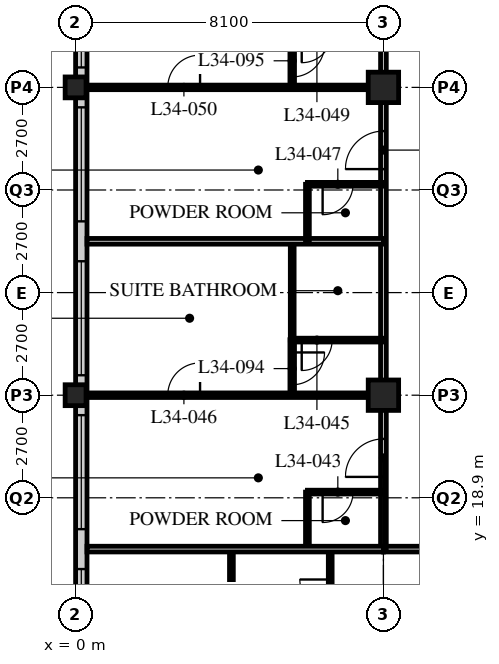
"""IFC4 building model, lengths in metres.
Left out: names, types, materials, properties, quantities, classifications, styles, units other than length and angle.
Written with IfcOpenShell. Run it as: python <this file> out.ifc"""

import sys

from ifc_helpers import new_model, si_unit, direction, frame, frame_2d, origin, origin_2d, place, context, subcontext, project, spatial, rectangle, hollow_rectangle, extrude, element, fill, save


model = new_model("IFC4")
c1 = context("Model", 3, precision=1e-05, world=origin(), true_north=direction((0.0, 1.0)))
c2 = subcontext(c1, "Body", "Model", "MODEL_VIEW")
j1 = project(units=[si_unit("LENGTHUNIT", "METRE"), si_unit("PLANEANGLEUNIT", "RADIAN")], contexts=[c1])
p1 = place(None, origin())
s1 = spatial("IfcSite", under=j1, at=p1, CompositionType="ELEMENT")
p2 = place(p1, origin())
s2 = spatial("IfcBuilding", under=s1, at=p2, CompositionType="ELEMENT")
p3 = place(p2, frame((0.0, 0.0, 134.0)))
s3 = spatial("IfcBuildingStorey", under=s2, at=p3, CompositionType="ELEMENT", Elevation=134.0)
for number, where, z_axis, x_axis in (
    (1, (0.0, 21.6, 0.0), (0.0, 0.0, 1.0), (1.0, 0.0, 0.0)),
    (2, (0.0, 29.7, 0.0), (0.0, 0.0, 1.0), (1.0, 0.0, 0.0)),
):
    element("IfcColumn", number, at=place(p3, frame(where, z_axis=z_axis, x_axis=x_axis)), inside=s3, PredefinedType="COLUMN", context=c2, shape_type="SweptSolid", body=[
        extrude(hollow_rectangle(XDim=0.55, YDim=0.55, WallThickness=0.04, at=origin_2d()), origin(), (0.0, 0.0, 1.0), 3.4),
    ])
for number, where, z_axis, x_axis in (
    (3, (8.1, 21.6, 0.0), (0.0, 0.0, 1.0), (1.0, 0.0, 0.0)),
    (4, (8.1, 29.7, 0.0), (0.0, 0.0, 1.0), (1.0, 0.0, 0.0)),
):
    element("IfcColumn", number, at=place(p3, frame(where, z_axis=z_axis, x_axis=x_axis)), inside=s3, PredefinedType="COLUMN", context=c2, shape_type="SweptSolid", body=[
        extrude(hollow_rectangle(XDim=0.8, YDim=0.8, WallThickness=0.08, at=origin_2d()), origin(), (0.0, 0.0, 1.0), 3.4),
    ])
p4 = place(p3, frame((0.15, 45.6, 0.0), z_axis=(0.0, 0.0, 1.0), x_axis=(0.0, -1.0, 0.0)))
e5 = element("IfcWall", 5, at=p4, inside=s3, PredefinedType="SOLIDWALL", context=c2, shape_type="SweptSolid", body=[
    extrude(rectangle(XDim=32.1, YDim=0.3, at=frame_2d((16.05, 0.0))), origin(), (0.0, 0.0, 1.0), 3.19),
])
p5 = place(p4, frame((0.225, 0.0, 0.9)))
e6 = element("IfcOpeningElement", 6, at=p5, cuts=e5, PredefinedType="OPENING", context=c2, shape_type="SweptSolid", body=[
    extrude(rectangle(XDim=3.0, YDim=2.0, at=frame_2d((1.5, 1.0))), frame((0.0, 0.16, 0.0), z_axis=(0.0, -1.0, 0.0), x_axis=(1.0, 0.0, 0.0)), (0.0, 0.0, 1.0), 0.32),
])
p6 = place(p4, frame((4.275, 0.0, 0.9)))
e7 = element("IfcOpeningElement", 7, at=p6, cuts=e5, PredefinedType="OPENING", context=c2, shape_type="SweptSolid", body=[
    extrude(rectangle(XDim=3.0, YDim=2.0, at=frame_2d((1.5, 1.0))), frame((0.0, 0.16, 0.0), z_axis=(0.0, -1.0, 0.0), x_axis=(1.0, 0.0, 0.0)), (0.0, 0.0, 1.0), 0.32),
])
p7 = place(p4, frame((8.325, 0.0, 0.9)))
e8 = element("IfcOpeningElement", 8, at=p7, cuts=e5, PredefinedType="OPENING", context=c2, shape_type="SweptSolid", body=[
    extrude(rectangle(XDim=3.0, YDim=2.0, at=frame_2d((1.5, 1.0))), frame((0.0, 0.16, 0.0), z_axis=(0.0, -1.0, 0.0), x_axis=(1.0, 0.0, 0.0)), (0.0, 0.0, 1.0), 0.32),
])
p8 = place(p4, frame((12.375, 0.0, 0.9)))
e9 = element("IfcOpeningElement", 9, at=p8, cuts=e5, PredefinedType="OPENING", context=c2, shape_type="SweptSolid", body=[
    extrude(rectangle(XDim=3.0, YDim=2.0, at=frame_2d((1.5, 1.0))), frame((0.0, 0.16, 0.0), z_axis=(0.0, -1.0, 0.0), x_axis=(1.0, 0.0, 0.0)), (0.0, 0.0, 1.0), 0.32),
])
p9 = place(p4, frame((16.425, 0.0, 0.9)))
e10 = element("IfcOpeningElement", 10, at=p9, cuts=e5, PredefinedType="OPENING", context=c2, shape_type="SweptSolid", body=[
    extrude(rectangle(XDim=3.0, YDim=2.0, at=frame_2d((1.5, 1.0))), frame((0.0, 0.16, 0.0), z_axis=(0.0, -1.0, 0.0), x_axis=(1.0, 0.0, 0.0)), (0.0, 0.0, 1.0), 0.32),
])
p10 = place(p4, frame((20.475, 0.0, 0.9)))
e11 = element("IfcOpeningElement", 11, at=p10, cuts=e5, PredefinedType="OPENING", context=c2, shape_type="SweptSolid", body=[
    extrude(rectangle(XDim=3.0, YDim=2.0, at=frame_2d((1.5, 1.0))), frame((0.0, 0.16, 0.0), z_axis=(0.0, -1.0, 0.0), x_axis=(1.0, 0.0, 0.0)), (0.0, 0.0, 1.0), 0.32),
])
p11 = place(p4, frame((24.525, 0.0, 0.9)))
e12 = element("IfcOpeningElement", 12, at=p11, cuts=e5, PredefinedType="OPENING", context=c2, shape_type="SweptSolid", body=[
    extrude(rectangle(XDim=3.0, YDim=2.0, at=frame_2d((1.5, 1.0))), frame((0.0, 0.16, 0.0), z_axis=(0.0, -1.0, 0.0), x_axis=(1.0, 0.0, 0.0)), (0.0, 0.0, 1.0), 0.32),
])
p12 = place(p4, frame((28.575, 0.0, 0.9)))
e13 = element("IfcOpeningElement", 13, at=p12, cuts=e5, PredefinedType="OPENING", context=c2, shape_type="SweptSolid", body=[
    extrude(rectangle(XDim=3.0, YDim=2.0, at=frame_2d((1.5, 1.0))), frame((0.0, 0.16, 0.0), z_axis=(0.0, -1.0, 0.0), x_axis=(1.0, 0.0, 0.0)), (0.0, 0.0, 1.0), 0.32),
])
p13 = place(p3, frame((8.1, 17.55, 0.0), z_axis=(0.0, 0.0, 1.0), x_axis=(1.0, 0.0, 0.0)))
e14 = element("IfcWall", 14, at=p13, inside=s3, PredefinedType="PARTITIONING", context=c2, shape_type="SweptSolid", body=[
    extrude(rectangle(XDim=36.45, YDim=0.15, at=frame_2d((18.225, 0.0))), origin(), (0.0, 0.0, 1.0), 3.19),
])
p14 = place(p13, frame((9.625, 0.0, 0.0)))
e15 = element("IfcOpeningElement", 15, at=p14, cuts=e14, PredefinedType="OPENING", context=c2, shape_type="SweptSolid", body=[
    extrude(rectangle(XDim=1.0, YDim=2.1, at=frame_2d((0.5, 1.05))), frame((0.0, 0.085, 0.0), z_axis=(0.0, -1.0, 0.0), x_axis=(1.0, 0.0, 0.0)), (0.0, 0.0, 1.0), 0.17),
])
p15 = place(p13, frame((18.1, 0.0, 0.0)))
e16 = element("IfcOpeningElement", 16, at=p15, cuts=e14, PredefinedType="OPENING", context=c2, shape_type="SweptSolid", body=[
    extrude(rectangle(XDim=1.0, YDim=2.1, at=frame_2d((0.5, 1.05))), frame((0.0, 0.085, 0.0), z_axis=(0.0, -1.0, 0.0), x_axis=(1.0, 0.0, 0.0)), (0.0, 0.0, 1.0), 0.17),
])
p16 = place(p13, frame((26.75, 0.0, 0.0)))
e17 = element("IfcOpeningElement", 17, at=p16, cuts=e14, PredefinedType="OPENING", context=c2, shape_type="SweptSolid", body=[
    extrude(rectangle(XDim=1.0, YDim=2.1, at=frame_2d((0.5, 1.05))), frame((0.0, 0.085, 0.0), z_axis=(0.0, -1.0, 0.0), x_axis=(1.0, 0.0, 0.0)), (0.0, 0.0, 1.0), 0.17),
])
p17 = place(p13, frame((30.8, 0.0, 0.0)))
e18 = element("IfcOpeningElement", 18, at=p17, cuts=e14, PredefinedType="OPENING", context=c2, shape_type="SweptSolid", body=[
    extrude(rectangle(XDim=1.0, YDim=2.1, at=frame_2d((0.5, 1.05))), frame((0.0, 0.085, 0.0), z_axis=(0.0, -1.0, 0.0), x_axis=(1.0, 0.0, 0.0)), (0.0, 0.0, 1.0), 0.17),
])
p18 = place(p13, frame((1.525, 0.0, 0.0)))
e19 = element("IfcOpeningElement", 19, at=p18, cuts=e14, PredefinedType="OPENING", context=c2, shape_type="SweptSolid", body=[
    extrude(rectangle(XDim=1.0, YDim=2.1, at=frame_2d((0.5, 1.05))), frame((0.0, 0.085, 0.0), z_axis=(0.0, -1.0, 0.0), x_axis=(1.0, 0.0, 0.0)), (0.0, 0.0, 1.0), 0.17),
])
p19 = place(p13, frame((33.925, 0.0, 0.0)))
e20 = element("IfcOpeningElement", 20, at=p19, cuts=e14, PredefinedType="OPENING", context=c2, shape_type="SweptSolid", body=[
    extrude(rectangle(XDim=1.0, YDim=2.1, at=frame_2d((0.5, 1.05))), frame((0.0, 0.085, 0.0), z_axis=(0.0, -1.0, 0.0), x_axis=(1.0, 0.0, 0.0)), (0.0, 0.0, 1.0), 0.17),
])
p20 = place(p3, frame((8.1, 17.55, 0.0), z_axis=(0.0, 0.0, 1.0), x_axis=(0.0, 1.0, 0.0)))
e21 = element("IfcWall", 21, at=p20, inside=s3, PredefinedType="PARTITIONING", context=c2, shape_type="SweptSolid", body=[
    extrude(rectangle(XDim=28.35, YDim=0.15, at=frame_2d((14.175, 0.0))), origin(), (0.0, 0.0, 1.0), 2.578),
])
p21 = place(p20, frame((1.9, 0.0, 0.0)))
e22 = element("IfcOpeningElement", 22, at=p21, cuts=e21, PredefinedType="OPENING", context=c2, shape_type="SweptSolid", body=[
    extrude(rectangle(XDim=1.0, YDim=2.1, at=frame_2d((0.5, 1.05))), frame((0.0, 0.085, 0.0), z_axis=(0.0, -1.0, 0.0), x_axis=(1.0, 0.0, 0.0)), (0.0, 0.0, 1.0), 0.17),
])
p22 = place(p20, frame((10.0, 0.0, 0.0)))
e23 = element("IfcOpeningElement", 23, at=p22, cuts=e21, PredefinedType="OPENING", context=c2, shape_type="SweptSolid", body=[
    extrude(rectangle(XDim=1.0, YDim=2.1, at=frame_2d((0.5, 1.05))), frame((0.0, 0.085, 0.0), z_axis=(0.0, -1.0, 0.0), x_axis=(1.0, 0.0, 0.0)), (0.0, 0.0, 1.0), 0.17),
])
p23 = place(p20, frame((18.1, 0.0, 0.0)))
e24 = element("IfcOpeningElement", 24, at=p23, cuts=e21, PredefinedType="OPENING", context=c2, shape_type="SweptSolid", body=[
    extrude(rectangle(XDim=1.0, YDim=2.1, at=frame_2d((0.5, 1.05))), frame((0.0, 0.085, 0.0), z_axis=(0.0, -1.0, 0.0), x_axis=(1.0, 0.0, 0.0)), (0.0, 0.0, 1.0), 0.17),
])
p24 = place(p20, frame((24.9, 0.0, 0.0)))
e25 = element("IfcOpeningElement", 25, at=p24, cuts=e21, PredefinedType="OPENING", context=c2, shape_type="SweptSolid", body=[
    extrude(rectangle(XDim=1.0, YDim=2.1, at=frame_2d((0.5, 1.05))), frame((0.0, 0.085, 0.0), z_axis=(0.0, -1.0, 0.0), x_axis=(1.0, 0.0, 0.0)), (0.0, 0.0, 1.0), 0.17),
])
p25 = place(p3, frame((6.1, 17.55, 0.0), z_axis=(0.0, 0.0, 1.0), x_axis=(0.0, 1.0, 0.0)))
e26 = element("IfcWall", 26, at=p25, inside=s3, PredefinedType="PARTITIONING", context=c2, shape_type="SweptSolid", body=[
    extrude(rectangle(XDim=1.5, YDim=0.1, at=frame_2d((0.75, 0.0))), origin(), (0.0, 0.0, 1.0), 3.19),
])
p26 = place(p3, frame((8.1, 19.05, 0.0), z_axis=(0.0, 0.0, 1.0), x_axis=(-1.0, 0.0, 0.0)))
e27 = element("IfcWall", 27, at=p26, inside=s3, PredefinedType="PARTITIONING", context=c2, shape_type="SweptSolid", body=[
    extrude(rectangle(XDim=2.0, YDim=0.1, at=frame_2d((1.0, 0.0))), origin(), (0.0, 0.0, 1.0), 3.19),
])
p27 = place(p26, frame((0.8, 0.0, 0.0)))
e28 = element("IfcOpeningElement", 28, at=p27, cuts=e27, PredefinedType="OPENING", context=c2, shape_type="SweptSolid", body=[
    extrude(rectangle(XDim=0.8, YDim=2.1, at=frame_2d((0.4, 1.05))), frame((0.0, 0.06, 0.0), z_axis=(0.0, -1.0, 0.0), x_axis=(1.0, 0.0, 0.0)), (0.0, 0.0, 1.0), 0.12),
])
p28 = place(p3, frame((5.7, 23.05, 0.0), z_axis=(0.0, 0.0, 1.0), x_axis=(0.0, 1.0, 0.0)))
e29 = element("IfcWall", 29, at=p28, inside=s3, PredefinedType="PARTITIONING", context=c2, shape_type="SweptSolid", body=[
    extrude(rectangle(XDim=2.6, YDim=0.1, at=frame_2d((1.3, 0.0))), origin(), (0.0, 0.0, 1.0), 3.19),
])
p29 = place(p3, frame((8.1, 23.05, 0.0), z_axis=(0.0, 0.0, 1.0), x_axis=(-1.0, 0.0, 0.0)))
e30 = element("IfcWall", 30, at=p29, inside=s3, PredefinedType="PARTITIONING", context=c2, shape_type="SweptSolid", body=[
    extrude(rectangle(XDim=2.4, YDim=0.1, at=frame_2d((1.2, 0.0))), origin(), (0.0, 0.0, 1.0), 3.19),
])
p30 = place(p29, frame((1.35, 0.0, 0.0)))
e31 = element("IfcOpeningElement", 31, at=p30, cuts=e30, PredefinedType="OPENING", context=c2, shape_type="SweptSolid", body=[
    extrude(rectangle(XDim=0.8, YDim=2.1, at=frame_2d((0.4, 1.05))), frame((0.0, 0.06, 0.0), z_axis=(0.0, -1.0, 0.0), x_axis=(1.0, 0.0, 0.0)), (0.0, 0.0, 1.0), 0.12),
])
p31 = place(p3, frame((8.1, 21.6, 0.0), z_axis=(0.0, 0.0, 1.0), x_axis=(-1.0, 0.0, 0.0)))
e32 = element("IfcWall", 32, at=p31, inside=s3, PredefinedType="PARTITIONING", context=c2, shape_type="SweptSolid", body=[
    extrude(rectangle(XDim=7.8, YDim=0.12, at=frame_2d((3.9, 0.0))), origin(), (0.0, 0.0, 1.0), 2.578),
])
p32 = place(p31, frame((4.825, 0.0, 0.0)))
e33 = element("IfcOpeningElement", 33, at=p32, cuts=e32, PredefinedType="OPENING", context=c2, shape_type="SweptSolid", body=[
    extrude(rectangle(XDim=0.85, YDim=2.1, at=frame_2d((0.425, 1.05))), frame((0.0, 0.07, 0.0), z_axis=(0.0, -1.0, 0.0), x_axis=(1.0, 0.0, 0.0)), (0.0, 0.0, 1.0), 0.14),
])
p33 = place(p3, frame((8.1, 25.65, 0.0), z_axis=(0.0, 0.0, 1.0), x_axis=(-1.0, 0.0, 0.0)))
e34 = element("IfcWall", 34, at=p33, inside=s3, PredefinedType="PARTITIONING", context=c2, shape_type="SweptSolid", body=[
    extrude(rectangle(XDim=7.8, YDim=0.15, at=frame_2d((3.9, 0.0))), origin(), (0.0, 0.0, 1.0), 3.19),
])
p34 = place(p3, frame((6.1, 25.65, 0.0), z_axis=(0.0, 0.0, 1.0), x_axis=(0.0, 1.0, 0.0)))
e35 = element("IfcWall", 35, at=p34, inside=s3, PredefinedType="PARTITIONING", context=c2, shape_type="SweptSolid", body=[
    extrude(rectangle(XDim=1.5, YDim=0.1, at=frame_2d((0.75, 0.0))), origin(), (0.0, 0.0, 1.0), 3.19),
])
p35 = place(p3, frame((8.1, 27.15, 0.0), z_axis=(0.0, 0.0, 1.0), x_axis=(-1.0, 0.0, 0.0)))
e36 = element("IfcWall", 36, at=p35, inside=s3, PredefinedType="PARTITIONING", context=c2, shape_type="SweptSolid", body=[
    extrude(rectangle(XDim=2.0, YDim=0.1, at=frame_2d((1.0, 0.0))), origin(), (0.0, 0.0, 1.0), 3.19),
])
p36 = place(p35, frame((0.8, 0.0, 0.0)))
e37 = element("IfcOpeningElement", 37, at=p36, cuts=e36, PredefinedType="OPENING", context=c2, shape_type="SweptSolid", body=[
    extrude(rectangle(XDim=0.8, YDim=2.1, at=frame_2d((0.4, 1.05))), frame((0.0, 0.06, 0.0), z_axis=(0.0, -1.0, 0.0), x_axis=(1.0, 0.0, 0.0)), (0.0, 0.0, 1.0), 0.12),
])
p37 = place(p3, frame((8.1, 29.7, 0.0), z_axis=(0.0, 0.0, 1.0), x_axis=(-1.0, 0.0, 0.0)))
e38 = element("IfcWall", 38, at=p37, inside=s3, PredefinedType="PARTITIONING", context=c2, shape_type="SweptSolid", body=[
    extrude(rectangle(XDim=7.8, YDim=0.12, at=frame_2d((3.9, 0.0))), origin(), (0.0, 0.0, 1.0), 2.578),
])
p38 = place(p37, frame((4.825, 0.0, 0.0)))
e39 = element("IfcOpeningElement", 39, at=p38, cuts=e38, PredefinedType="OPENING", context=c2, shape_type="SweptSolid", body=[
    extrude(rectangle(XDim=0.85, YDim=2.1, at=frame_2d((0.425, 1.05))), frame((0.0, 0.07, 0.0), z_axis=(0.0, -1.0, 0.0), x_axis=(1.0, 0.0, 0.0)), (0.0, 0.0, 1.0), 0.14),
])
p39 = place(p3, frame((6.7, 17.55, 0.0), z_axis=(0.0, 0.0, 1.0), x_axis=(0.0, -1.0, 0.0)))
e40 = element("IfcWall", 40, at=p39, inside=s3, PredefinedType="PARTITIONING", context=c2, shape_type="SweptSolid", body=[
    extrude(rectangle(XDim=2.4, YDim=0.1, at=frame_2d((1.2, 0.0))), origin(), (0.0, 0.0, 1.0), 3.19),
])
p40 = place(p39, frame((0.8, 0.0, 0.0)))
e41 = element("IfcOpeningElement", 41, at=p40, cuts=e40, PredefinedType="OPENING", context=c2, shape_type="SweptSolid", body=[
    extrude(rectangle(XDim=0.8, YDim=2.1, at=frame_2d((0.4, 1.05))), frame((0.0, 0.06, 0.0), z_axis=(0.0, -1.0, 0.0), x_axis=(1.0, 0.0, 0.0)), (0.0, 0.0, 1.0), 0.12),
])
p41 = place(p3, frame((4.1, 17.55, 0.0), z_axis=(0.0, 0.0, 1.0), x_axis=(0.0, -1.0, 0.0)))
e42 = element("IfcWall", 42, at=p41, inside=s3, PredefinedType="PARTITIONING", context=c2, shape_type="SweptSolid", body=[
    extrude(rectangle(XDim=2.4, YDim=0.1, at=frame_2d((1.2, 0.0))), origin(), (0.0, 0.0, 1.0), 3.19),
])
p42 = place(p3, frame((0.3, 17.55, 0.0), z_axis=(0.0, 0.0, 1.0), x_axis=(1.0, 0.0, 0.0)))
e43 = element("IfcWall", 43, at=p42, inside=s3, PredefinedType="PARTITIONING", context=c2, shape_type="SweptSolid", body=[
    extrude(rectangle(XDim=7.8, YDim=0.15, at=frame_2d((3.9, 0.0))), origin(), (0.0, 0.0, 1.0), 3.19),
])
p43 = place(p3, frame((5.7, 21.6, 0.0), z_axis=(0.0, 0.0, 1.0), x_axis=(0.0, 1.0, 0.0)))
e44 = element("IfcWall", 44, at=p43, inside=s3, PredefinedType="PARTITIONING", context=c2, shape_type="SweptSolid", body=[
    extrude(rectangle(XDim=1.46, YDim=0.12, at=frame_2d((0.73, 0.0))), origin(), (0.0, 0.0, 1.0), 3.19),
])
p44 = place(p43, frame((0.275, 0.0, 0.0)))
e45 = element("IfcOpeningElement", 45, at=p44, cuts=e44, PredefinedType="OPENING", context=c2, shape_type="SweptSolid", body=[
    extrude(rectangle(XDim=0.85, YDim=2.1, at=frame_2d((0.425, 1.05))), frame((0.0, 0.07, 0.0), z_axis=(0.0, -1.0, 0.0), x_axis=(1.0, 0.0, 0.0)), (0.0, 0.0, 1.0), 0.14),
])
p45 = place(p3, frame((5.7, 29.7, 0.0), z_axis=(0.0, 0.0, 1.0), x_axis=(0.0, 1.0, 0.0)))
e46 = element("IfcWall", 46, at=p45, inside=s3, PredefinedType="PARTITIONING", context=c2, shape_type="SweptSolid", body=[
    extrude(rectangle(XDim=1.46, YDim=0.12, at=frame_2d((0.73, 0.0))), origin(), (0.0, 0.0, 1.0), 3.19),
])
p46 = place(p45, frame((0.275, 0.0, 0.0)))
e47 = element("IfcOpeningElement", 47, at=p46, cuts=e46, PredefinedType="OPENING", context=c2, shape_type="SweptSolid", body=[
    extrude(rectangle(XDim=0.85, YDim=2.1, at=frame_2d((0.425, 1.05))), frame((0.0, 0.07, 0.0), z_axis=(0.0, -1.0, 0.0), x_axis=(1.0, 0.0, 0.0)), (0.0, 0.0, 1.0), 0.14),
])
p47 = place(p8, origin())
e48 = element("IfcWindow", 48, at=p47, inside=s3, PartitioningType="SINGLE_PANEL", PredefinedType="WINDOW", context=c2, shape_type="SweptSolid", body=[
    extrude(rectangle(XDim=3.0, YDim=2.0, at=frame_2d((1.5, 1.0))), frame((0.0, 0.03, 0.0), z_axis=(0.0, -1.0, 0.0), x_axis=(1.0, 0.0, 0.0)), (0.0, 0.0, 1.0), 0.06),
])
fill(e9, e48)
p48 = place(p9, origin())
e49 = element("IfcWindow", 49, at=p48, inside=s3, PartitioningType="SINGLE_PANEL", PredefinedType="WINDOW", context=c2, shape_type="SweptSolid", body=[
    extrude(rectangle(XDim=3.0, YDim=2.0, at=frame_2d((1.5, 1.0))), frame((0.0, 0.03, 0.0), z_axis=(0.0, -1.0, 0.0), x_axis=(1.0, 0.0, 0.0)), (0.0, 0.0, 1.0), 0.06),
])
fill(e10, e49)
p49 = place(p10, origin())
e50 = element("IfcWindow", 50, at=p49, inside=s3, PartitioningType="SINGLE_PANEL", PredefinedType="WINDOW", context=c2, shape_type="SweptSolid", body=[
    extrude(rectangle(XDim=3.0, YDim=2.0, at=frame_2d((1.5, 1.0))), frame((0.0, 0.03, 0.0), z_axis=(0.0, -1.0, 0.0), x_axis=(1.0, 0.0, 0.0)), (0.0, 0.0, 1.0), 0.06),
])
fill(e11, e50)
p50 = place(p11, origin())
e51 = element("IfcWindow", 51, at=p50, inside=s3, PartitioningType="SINGLE_PANEL", PredefinedType="WINDOW", context=c2, shape_type="SweptSolid", body=[
    extrude(rectangle(XDim=3.0, YDim=2.0, at=frame_2d((1.5, 1.0))), frame((0.0, 0.03, 0.0), z_axis=(0.0, -1.0, 0.0), x_axis=(1.0, 0.0, 0.0)), (0.0, 0.0, 1.0), 0.06),
])
fill(e12, e51)
p51 = place(p12, origin())
e52 = element("IfcWindow", 52, at=p51, inside=s3, PartitioningType="SINGLE_PANEL", PredefinedType="WINDOW", context=c2, shape_type="SweptSolid", body=[
    extrude(rectangle(XDim=3.0, YDim=2.0, at=frame_2d((1.5, 1.0))), frame((0.0, 0.03, 0.0), z_axis=(0.0, -1.0, 0.0), x_axis=(1.0, 0.0, 0.0)), (0.0, 0.0, 1.0), 0.06),
])
fill(e13, e52)
p52 = place(p27, origin())
e53 = element("IfcDoor", 53, at=p52, inside=s3, OperationType="SINGLE_SWING_RIGHT", PredefinedType="DOOR", context=c2, shape_type="SweptSolid", body=[
    extrude(rectangle(XDim=0.8, YDim=2.1, at=frame_2d((0.4, 1.05))), frame((0.0, 0.025, 0.0), z_axis=(0.0, -1.0, 0.0), x_axis=(1.0, 0.0, 0.0)), (0.0, 0.0, 1.0), 0.05),
])
fill(e28, e53)
p53 = place(p21, origin())
e54 = element("IfcDoor", 54, at=p53, inside=s3, OperationType="SINGLE_SWING_LEFT", PredefinedType="DOOR", context=c2, shape_type="SweptSolid", body=[
    extrude(rectangle(XDim=1.0, YDim=2.1, at=frame_2d((0.5, 1.05))), frame((0.0, 0.025, 0.0), z_axis=(0.0, -1.0, 0.0), x_axis=(1.0, 0.0, 0.0)), (0.0, 0.0, 1.0), 0.05),
])
fill(e22, e54)
p54 = place(p30, origin())
e55 = element("IfcDoor", 55, at=p54, inside=s3, OperationType="SINGLE_SWING_RIGHT", PredefinedType="DOOR", context=c2, shape_type="SweptSolid", body=[
    extrude(rectangle(XDim=0.8, YDim=2.1, at=frame_2d((0.4, 1.05))), frame((0.0, 0.025, 0.0), z_axis=(0.0, -1.0, 0.0), x_axis=(1.0, 0.0, 0.0)), (0.0, 0.0, 1.0), 0.05),
])
fill(e31, e55)
p55 = place(p32, origin())
e56 = element("IfcDoor", 56, at=p55, inside=s3, OperationType="SINGLE_SWING_RIGHT", PredefinedType="DOOR", context=c2, shape_type="SweptSolid", body=[
    extrude(rectangle(XDim=0.85, YDim=2.1, at=frame_2d((0.425, 1.05))), frame((0.0, 0.025, 0.0), z_axis=(0.0, -1.0, 0.0), x_axis=(1.0, 0.0, 0.0)), (0.0, 0.0, 1.0), 0.05),
])
fill(e33, e56)
p56 = place(p36, origin())
e57 = element("IfcDoor", 57, at=p56, inside=s3, OperationType="SINGLE_SWING_RIGHT", PredefinedType="DOOR", context=c2, shape_type="SweptSolid", body=[
    extrude(rectangle(XDim=0.8, YDim=2.1, at=frame_2d((0.4, 1.05))), frame((0.0, 0.025, 0.0), z_axis=(0.0, -1.0, 0.0), x_axis=(1.0, 0.0, 0.0)), (0.0, 0.0, 1.0), 0.05),
])
fill(e37, e57)
p57 = place(p22, origin())
e58 = element("IfcDoor", 58, at=p57, inside=s3, OperationType="SINGLE_SWING_LEFT", PredefinedType="DOOR", context=c2, shape_type="SweptSolid", body=[
    extrude(rectangle(XDim=1.0, YDim=2.1, at=frame_2d((0.5, 1.05))), frame((0.0, 0.025, 0.0), z_axis=(0.0, -1.0, 0.0), x_axis=(1.0, 0.0, 0.0)), (0.0, 0.0, 1.0), 0.05),
])
fill(e23, e58)
p58 = place(p38, origin())
e59 = element("IfcDoor", 59, at=p58, inside=s3, OperationType="SINGLE_SWING_RIGHT", PredefinedType="DOOR", context=c2, shape_type="SweptSolid", body=[
    extrude(rectangle(XDim=0.85, YDim=2.1, at=frame_2d((0.425, 1.05))), frame((0.0, 0.025, 0.0), z_axis=(0.0, -1.0, 0.0), x_axis=(1.0, 0.0, 0.0)), (0.0, 0.0, 1.0), 0.05),
])
fill(e39, e59)
p59 = place(p40, origin())
e60 = element("IfcDoor", 60, at=p59, inside=s3, OperationType="SINGLE_SWING_RIGHT", PredefinedType="DOOR", context=c2, shape_type="SweptSolid", body=[
    extrude(rectangle(XDim=0.8, YDim=2.1, at=frame_2d((0.4, 1.05))), frame((0.0, 0.025, 0.0), z_axis=(0.0, -1.0, 0.0), x_axis=(1.0, 0.0, 0.0)), (0.0, 0.0, 1.0), 0.05),
])
fill(e41, e60)
p60 = place(p44, origin())
e61 = element("IfcDoor", 61, at=p60, inside=s3, OperationType="SINGLE_SWING_LEFT", PredefinedType="DOOR", context=c2, shape_type="SweptSolid", body=[
    extrude(rectangle(XDim=0.85, YDim=2.1, at=frame_2d((0.425, 1.05))), frame((0.0, 0.025, 0.0), z_axis=(0.0, -1.0, 0.0), x_axis=(1.0, 0.0, 0.0)), (0.0, 0.0, 1.0), 0.05),
])
fill(e45, e61)
p61 = place(p46, origin())
e62 = element("IfcDoor", 62, at=p61, inside=s3, OperationType="SINGLE_SWING_LEFT", PredefinedType="DOOR", context=c2, shape_type="SweptSolid", body=[
    extrude(rectangle(XDim=0.85, YDim=2.1, at=frame_2d((0.425, 1.05))), frame((0.0, 0.025, 0.0), z_axis=(0.0, -1.0, 0.0), x_axis=(1.0, 0.0, 0.0)), (0.0, 0.0, 1.0), 0.05),
])
fill(e47, e62)
save(model, sys.argv[1])
